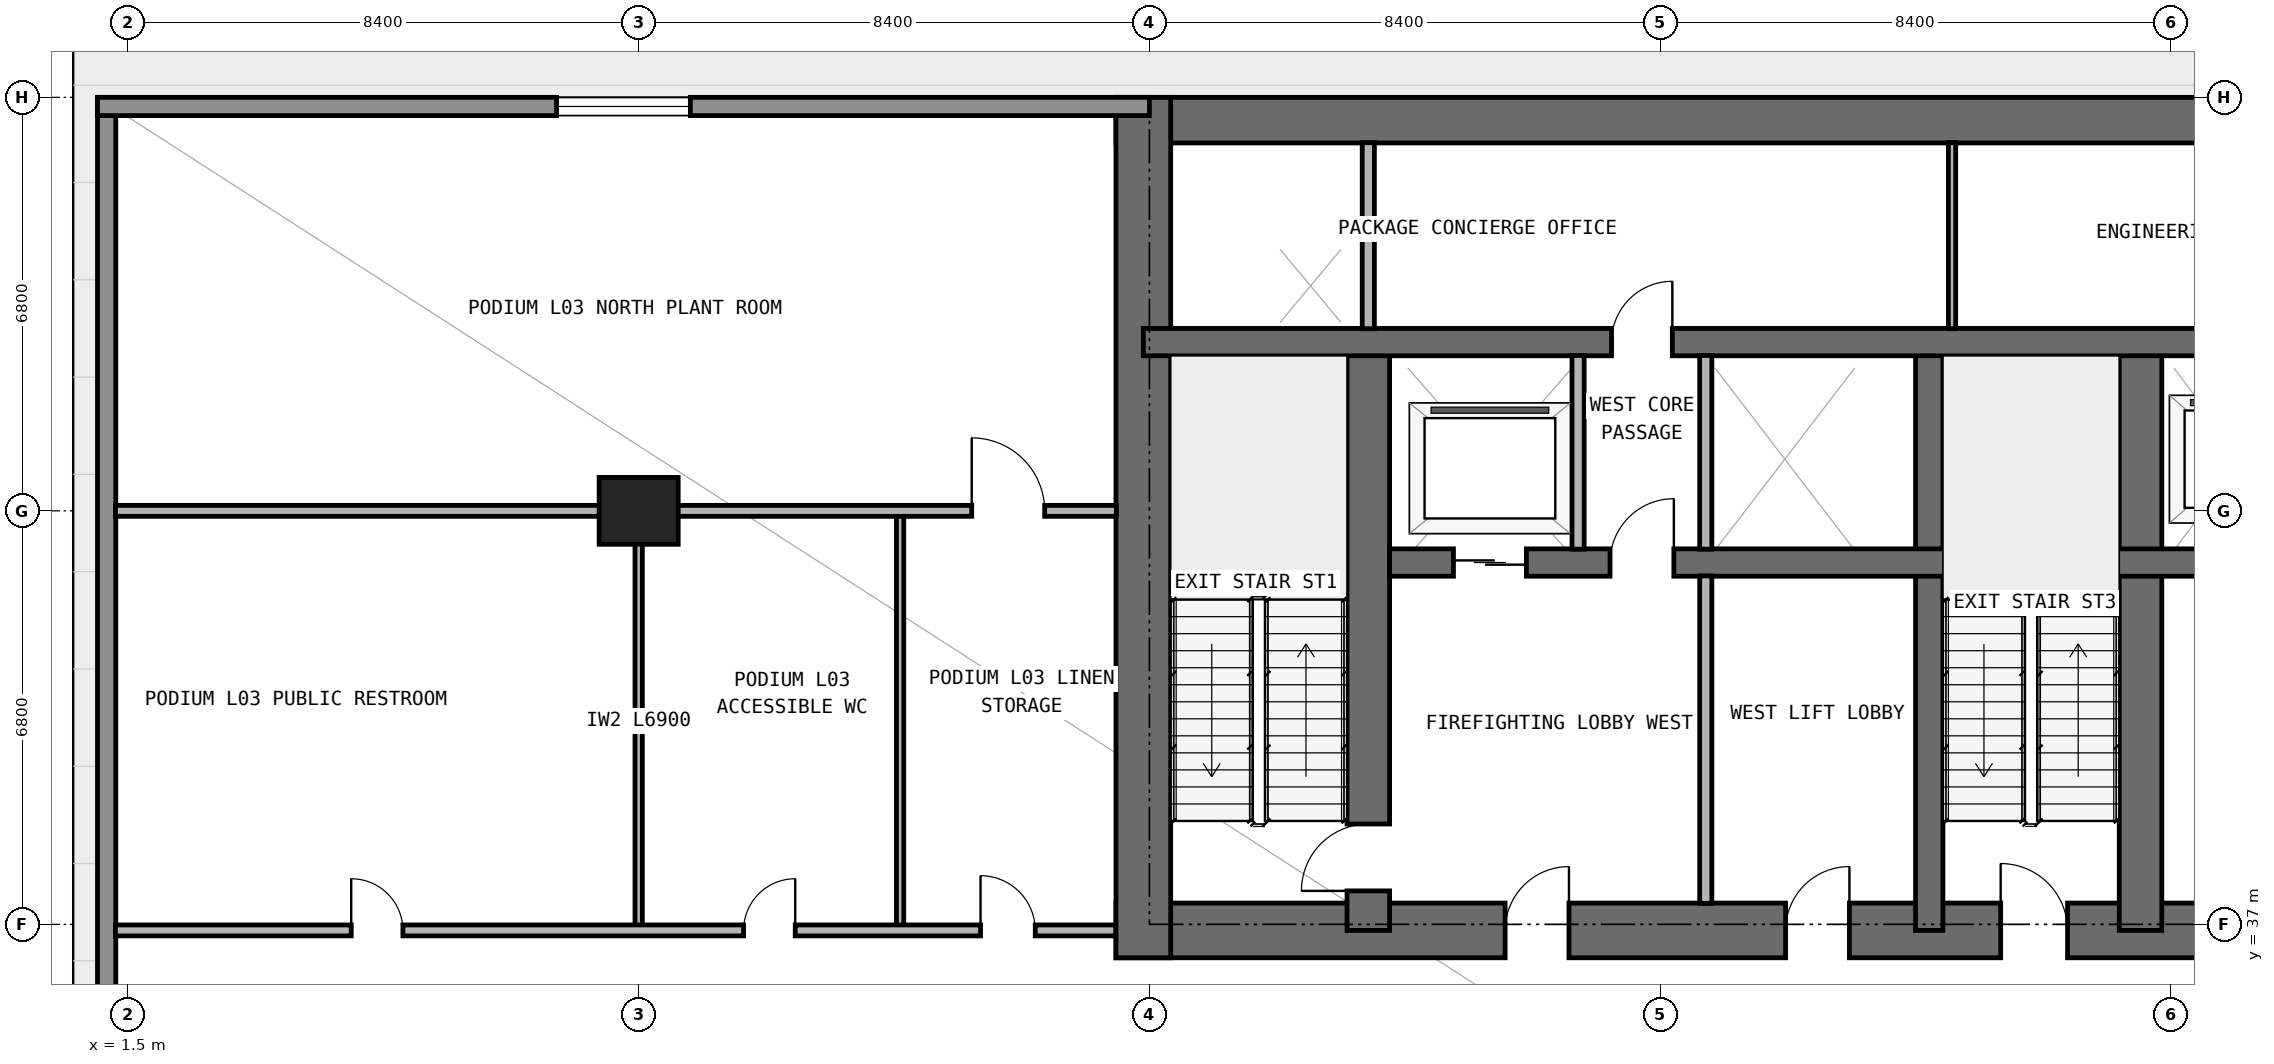
"""IFC4 building model, lengths in metres.
Left out: names, types, materials, properties, quantities, classifications, styles, units other than length and angle.
Written with IfcOpenShell. Run it as: python <this file> out.ifc"""

import sys

from ifc_helpers import new_model, si_unit, direction, frame, frame_2d, origin, origin_2d, place, context, subcontext, project, spatial, rectangle, extrude, element, fill, save


model = new_model("IFC4")
c1 = context("Model", 3, precision=1e-05, world=origin(), true_north=direction((0.0, 1.0)))
c2 = subcontext(c1, "Body", "Model", "MODEL_VIEW")
j1 = project(units=[si_unit("LENGTHUNIT", "METRE"), si_unit("PLANEANGLEUNIT", "RADIAN")], contexts=[c1])
p1 = place(None, origin())
s1 = spatial("IfcSite", under=j1, at=p1, CompositionType="ELEMENT")
p2 = place(p1, origin())
s2 = spatial("IfcBuilding", under=s1, at=p2, CompositionType="ELEMENT")
p3 = place(p2, frame((0.0, 0.0, 15.0)))
s3 = spatial("IfcBuildingStorey", under=s2, at=p3, CompositionType="ELEMENT", Elevation=15.0)
p4 = place(p3, frame((9.9, 43.8, 0.0), z_axis=(0.0, 0.0, 1.0), x_axis=(1.0, 0.0, 0.0)))
e1 = element("IfcColumn", 1, at=p4, inside=s3, PredefinedType="COLUMN", context=c2, shape_type="SweptSolid", body=[
    extrude(rectangle(XDim=1.3, YDim=1.1, at=origin_2d()), origin(), (0.0, 0.0, 1.0), 4.5),
])
p5 = place(p3, frame((17.75, 36.9, 0.0), z_axis=(0.0, 0.0, 1.0), x_axis=(1.0, 0.0, 0.0)))
e2 = element("IfcWall", 2, at=p5, inside=s3, PredefinedType="SHEAR", context=c2, shape_type="SweptSolid", body=[
    extrude(rectangle(XDim=42.3, YDim=0.9, at=frame_2d((21.15, 0.0))), origin(), (0.0, 0.0, 1.0), 4.5),
])
p6 = place(p5, frame((14.55, 0.0, 0.0)))
e3 = element("IfcOpeningElement", 3, at=p6, cuts=e2, PredefinedType="OPENING", context=c2, shape_type="SweptSolid", body=[
    extrude(rectangle(XDim=1.1, YDim=2.15, at=frame_2d((0.55, 1.075))), frame((0.0, 0.46, 0.0), z_axis=(0.0, -1.0, 0.0), x_axis=(1.0, 0.0, 0.0)), (0.0, 0.0, 1.0), 0.92),
])
p7 = place(p5, frame((6.4, 0.0, 0.0)))
e4 = element("IfcOpeningElement", 4, at=p7, cuts=e2, PredefinedType="OPENING", context=c2, shape_type="SweptSolid", body=[
    extrude(rectangle(XDim=1.05, YDim=2.15, at=frame_2d((0.525, 1.075))), frame((0.0, 0.46, 0.0), z_axis=(0.0, -1.0, 0.0), x_axis=(1.0, 0.0, 0.0)), (0.0, 0.0, 1.0), 0.92),
])
p8 = place(p5, frame((34.9, 0.0, 0.0)))
e5 = element("IfcOpeningElement", 5, at=p8, cuts=e2, PredefinedType="OPENING", context=c2, shape_type="SweptSolid", body=[
    extrude(rectangle(XDim=1.05, YDim=2.15, at=frame_2d((0.525, 1.075))), frame((0.0, 0.46, 0.0), z_axis=(0.0, -1.0, 0.0), x_axis=(1.0, 0.0, 0.0)), (0.0, 0.0, 1.0), 0.92),
])
p9 = place(p5, frame((11.012, 0.0, 0.0)))
e6 = element("IfcOpeningElement", 6, at=p9, cuts=e2, PredefinedType="OPENING", context=c2, shape_type="SweptSolid", body=[
    extrude(rectangle(XDim=1.05, YDim=2.15, at=frame_2d((0.525, 1.075))), frame((0.0, 0.46, 0.0), z_axis=(0.0, -1.0, 0.0), x_axis=(1.0, 0.0, 0.0)), (0.0, 0.0, 1.0), 0.92),
])
p10 = place(p5, frame((24.25, 0.0, 0.0)))
e7 = element("IfcOpeningElement", 7, at=p10, cuts=e2, PredefinedType="OPENING", context=c2, shape_type="SweptSolid", body=[
    extrude(rectangle(XDim=1.05, YDim=2.15, at=frame_2d((0.525, 1.075))), frame((0.0, 0.46, 0.0), z_axis=(0.0, -1.0, 0.0), x_axis=(1.0, 0.0, 0.0)), (0.0, 0.0, 1.0), 0.92),
])
p11 = place(p3, frame((17.75, 50.225, 0.0), z_axis=(0.0, 0.0, 1.0), x_axis=(1.0, 0.0, 0.0)))
e8 = element("IfcWall", 8, at=p11, inside=s3, PredefinedType="SHEAR", context=c2, shape_type="SweptSolid", body=[
    extrude(rectangle(XDim=42.3, YDim=0.75, at=frame_2d((21.15, 0.0))), origin(), (0.0, 0.0, 1.0), 4.5),
])
p12 = place(p3, frame((18.2, 36.45, 0.0), z_axis=(0.0, 0.0, 1.0), x_axis=(0.0, 1.0, 0.0)))
e9 = element("IfcWall", 9, at=p12, inside=s3, PredefinedType="SHEAR", context=c2, shape_type="SweptSolid", body=[
    extrude(rectangle(XDim=14.15, YDim=0.9, at=frame_2d((7.075, 0.0))), origin(), (0.0, 0.0, 1.0), 4.5),
])
p13 = place(p3, frame((21.9, 36.9, 0.0), z_axis=(0.0, 0.0, 1.0), x_axis=(0.0, 1.0, 0.0)))
e10 = element("IfcWall", 10, at=p13, inside=s3, PredefinedType="SHEAR", context=c2, shape_type="SweptSolid", body=[
    extrude(rectangle(XDim=9.675, YDim=0.7, at=frame_2d((4.837, 0.0))), origin(), (0.0, 0.0, 1.0), 4.5),
])
p14 = place(p13, frame((0.65, 0.0, 0.0)))
e11 = element("IfcOpeningElement", 11, at=p14, cuts=e10, PredefinedType="OPENING", context=c2, shape_type="SweptSolid", body=[
    extrude(rectangle(XDim=1.1, YDim=2.15, at=frame_2d((0.55, 1.075))), frame((0.0, 0.36, 0.0), z_axis=(0.0, -1.0, 0.0), x_axis=(1.0, 0.0, 0.0)), (0.0, 0.0, 1.0), 0.72),
])
p15 = place(p3, frame((31.125, 36.9, 0.0), z_axis=(0.0, 0.0, 1.0), x_axis=(0.0, 1.0, 0.0)))
e12 = element("IfcWall", 12, at=p15, inside=s3, PredefinedType="SHEAR", context=c2, shape_type="SweptSolid", body=[
    extrude(rectangle(XDim=9.675, YDim=0.45, at=frame_2d((4.837, 0.0))), origin(), (0.0, 0.0, 1.0), 4.5),
])
p16 = place(p3, frame((34.6, 36.9, 0.0), z_axis=(0.0, 0.0, 1.0), x_axis=(0.0, 1.0, 0.0)))
e13 = element("IfcWall", 13, at=p16, inside=s3, PredefinedType="SHEAR", context=c2, shape_type="SweptSolid", body=[
    extrude(rectangle(XDim=9.675, YDim=0.7, at=frame_2d((4.837, 0.0))), origin(), (0.0, 0.0, 1.0), 4.5),
])
p17 = place(p3, frame((22.25, 42.95, 0.0), z_axis=(0.0, 0.0, 1.0), x_axis=(1.0, 0.0, 0.0)))
e14 = element("IfcWall", 14, at=p17, inside=s3, PredefinedType="SHEAR", context=c2, shape_type="SweptSolid", body=[
    extrude(rectangle(XDim=33.3, YDim=0.45, at=frame_2d((16.65, 0.0))), origin(), (0.0, 0.0, 1.0), 4.5),
])
p18 = place(p17, frame((1.05, 0.0, 0.0)))
e15 = element("IfcOpeningElement", 15, at=p18, cuts=e14, PredefinedType="OPENING", context=c2, shape_type="SweptSolid", body=[
    extrude(rectangle(XDim=1.2, YDim=2.2, at=frame_2d((0.6, 1.1))), frame((0.0, 0.235, 0.0), z_axis=(0.0, -1.0, 0.0), x_axis=(1.0, 0.0, 0.0)), (0.0, 0.0, 1.0), 0.47),
])
p19 = place(p17, frame((31.05, 0.0, 0.0)))
e16 = element("IfcOpeningElement", 16, at=p19, cuts=e14, PredefinedType="OPENING", context=c2, shape_type="SweptSolid", body=[
    extrude(rectangle(XDim=1.2, YDim=2.2, at=frame_2d((0.6, 1.1))), frame((0.0, 0.235, 0.0), z_axis=(0.0, -1.0, 0.0), x_axis=(1.0, 0.0, 0.0)), (0.0, 0.0, 1.0), 0.47),
])
p20 = place(p17, frame((13.5, 0.0, 0.0)))
e17 = element("IfcOpeningElement", 17, at=p20, cuts=e14, PredefinedType="OPENING", context=c2, shape_type="SweptSolid", body=[
    extrude(rectangle(XDim=1.1, YDim=2.2, at=frame_2d((0.55, 1.1))), frame((0.0, 0.235, 0.0), z_axis=(0.0, -1.0, 0.0), x_axis=(1.0, 0.0, 0.0)), (0.0, 0.0, 1.0), 0.47),
])
p21 = place(p17, frame((16.1, 0.0, 0.0)))
e18 = element("IfcOpeningElement", 18, at=p21, cuts=e14, PredefinedType="OPENING", context=c2, shape_type="SweptSolid", body=[
    extrude(rectangle(XDim=1.1, YDim=2.2, at=frame_2d((0.55, 1.1))), frame((0.0, 0.235, 0.0), z_axis=(0.0, -1.0, 0.0), x_axis=(1.0, 0.0, 0.0)), (0.0, 0.0, 1.0), 0.47),
])
p22 = place(p17, frame((18.7, 0.0, 0.0)))
e19 = element("IfcOpeningElement", 19, at=p22, cuts=e14, PredefinedType="OPENING", context=c2, shape_type="SweptSolid", body=[
    extrude(rectangle(XDim=1.1, YDim=2.2, at=frame_2d((0.55, 1.1))), frame((0.0, 0.235, 0.0), z_axis=(0.0, -1.0, 0.0), x_axis=(1.0, 0.0, 0.0)), (0.0, 0.0, 1.0), 0.47),
])
p23 = place(p17, frame((3.625, 0.0, 0.0)))
e20 = element("IfcOpeningElement", 20, at=p23, cuts=e14, PredefinedType="OPENING", context=c2, shape_type="SweptSolid", body=[
    extrude(rectangle(XDim=1.05, YDim=2.15, at=frame_2d((0.525, 1.075))), frame((0.0, 0.235, 0.0), z_axis=(0.0, -1.0, 0.0), x_axis=(1.0, 0.0, 0.0)), (0.0, 0.0, 1.0), 0.47),
])
p24 = place(p17, frame((28.675, 0.0, 0.0)))
e21 = element("IfcOpeningElement", 21, at=p24, cuts=e14, PredefinedType="OPENING", context=c2, shape_type="SweptSolid", body=[
    extrude(rectangle(XDim=1.05, YDim=2.15, at=frame_2d((0.525, 1.075))), frame((0.0, 0.235, 0.0), z_axis=(0.0, -1.0, 0.0), x_axis=(1.0, 0.0, 0.0)), (0.0, 0.0, 1.0), 0.47),
])
p25 = place(p3, frame((18.2, 46.575, 0.0), z_axis=(0.0, 0.0, 1.0), x_axis=(1.0, 0.0, 0.0)))
e22 = element("IfcWall", 22, at=p25, inside=s3, PredefinedType="SHEAR", context=c2, shape_type="SweptSolid", body=[
    extrude(rectangle(XDim=41.4, YDim=0.45, at=frame_2d((20.7, 0.0))), origin(), (0.0, 0.0, 1.0), 4.5),
])
p26 = place(p25, frame((7.7, 0.0, 0.0)))
e23 = element("IfcOpeningElement", 23, at=p26, cuts=e22, PredefinedType="OPENING", context=c2, shape_type="SweptSolid", body=[
    extrude(rectangle(XDim=1.0, YDim=2.2, at=frame_2d((0.5, 1.1))), frame((0.0, 0.235, 0.0), z_axis=(0.0, -1.0, 0.0), x_axis=(1.0, 0.0, 0.0)), (0.0, 0.0, 1.0), 0.47),
])
p27 = place(p25, frame((32.725, 0.0, 0.0)))
e24 = element("IfcOpeningElement", 24, at=p27, cuts=e22, PredefinedType="OPENING", context=c2, shape_type="SweptSolid", body=[
    extrude(rectangle(XDim=1.05, YDim=2.15, at=frame_2d((0.525, 1.075))), frame((0.0, 0.235, 0.0), z_axis=(0.0, -1.0, 0.0), x_axis=(1.0, 0.0, 0.0)), (0.0, 0.0, 1.0), 0.47),
])
p28 = place(p3, frame((1.15, 26.2, 0.0), z_axis=(0.0, 0.0, 1.0), x_axis=(0.0, 1.0, 0.0)))
e25 = element("IfcWall", 25, at=p28, inside=s3, PredefinedType="STANDARD", context=c2, shape_type="SweptSolid", body=[
    extrude(rectangle(XDim=24.4, YDim=0.3, at=frame_2d((12.2, 0.0))), origin(), (0.0, 0.0, 1.0), 4.5),
])
p29 = place(p3, frame((1.0, 50.45, 0.0), z_axis=(0.0, 0.0, 1.0), x_axis=(1.0, 0.0, 0.0)))
e26 = element("IfcWall", 26, at=p29, inside=s3, PredefinedType="STANDARD", context=c2, shape_type="SweptSolid", body=[
    extrude(rectangle(XDim=17.3, YDim=0.3, at=frame_2d((8.65, 0.0))), origin(), (0.0, 0.0, 1.0), 4.5),
])
p30 = place(p29, frame((7.55, 0.0, 0.85)))
e27 = element("IfcOpeningElement", 27, at=p30, cuts=e26, PredefinedType="OPENING", context=c2, shape_type="SweptSolid", body=[
    extrude(rectangle(XDim=2.2, YDim=1.55, at=frame_2d((1.1, 0.775))), frame((0.0, 0.16, 0.0), z_axis=(0.0, -1.0, 0.0), x_axis=(1.0, 0.0, 0.0)), (0.0, 0.0, 1.0), 0.32),
])
p31 = place(p3, frame((9.9, 36.9, 0.0), z_axis=(0.0, 0.0, 1.0), x_axis=(0.0, 1.0, 0.0)))
e28 = element("IfcWall", 28, at=p31, inside=s3, PredefinedType="PARTITIONING", context=c2, shape_type="SweptSolid", body=[
    extrude(rectangle(XDim=6.9, YDim=0.12, at=frame_2d((3.45, 0.0))), origin(), (0.0, 0.0, 1.0), 3.464),
])
p32 = place(p3, frame((14.2, 36.9, 0.0), z_axis=(0.0, 0.0, 1.0), x_axis=(0.0, 1.0, 0.0)))
e29 = element("IfcWall", 29, at=p32, inside=s3, PredefinedType="PARTITIONING", context=c2, shape_type="SweptSolid", body=[
    extrude(rectangle(XDim=6.9, YDim=0.12, at=frame_2d((3.45, 0.0))), origin(), (0.0, 0.0, 1.0), 4.5),
])
p33 = place(p3, frame((21.9, 46.795, 0.0), z_axis=(0.0, 0.0, 1.0), x_axis=(0.0, 1.0, 0.0)))
e30 = element("IfcWall", 30, at=p33, inside=s3, PredefinedType="PARTITIONING", context=c2, shape_type="SweptSolid", body=[
    extrude(rectangle(XDim=3.06, YDim=0.2, at=frame_2d((1.53, 0.0))), origin(), (0.0, 0.0, 1.0), 4.5),
])
p34 = place(p3, frame((25.35, 43.17, 0.0), z_axis=(0.0, 0.0, 1.0), x_axis=(0.0, 1.0, 0.0)))
e31 = element("IfcWall", 31, at=p34, inside=s3, PredefinedType="PARTITIONING", context=c2, shape_type="SweptSolid", body=[
    extrude(rectangle(XDim=3.185, YDim=0.2, at=frame_2d((1.593, 0.0))), origin(), (0.0, 0.0, 1.0), 4.5),
])
p35 = place(p3, frame((27.45, 37.345, 0.0), z_axis=(0.0, 0.0, 1.0), x_axis=(0.0, 1.0, 0.0)))
e32 = element("IfcWall", 32, at=p35, inside=s3, PredefinedType="PARTITIONING", context=c2, shape_type="SweptSolid", body=[
    extrude(rectangle(XDim=5.385, YDim=0.2, at=frame_2d((2.692, 0.0))), origin(), (0.0, 0.0, 1.0), 4.5),
])
p36 = place(p3, frame((27.45, 43.17, 0.0), z_axis=(0.0, 0.0, 1.0), x_axis=(0.0, 1.0, 0.0)))
e33 = element("IfcWall", 33, at=p36, inside=s3, PredefinedType="PARTITIONING", context=c2, shape_type="SweptSolid", body=[
    extrude(rectangle(XDim=3.185, YDim=0.2, at=frame_2d((1.593, 0.0))), origin(), (0.0, 0.0, 1.0), 4.5),
])
p37 = place(p3, frame((31.5, 46.795, 0.0), z_axis=(0.0, 0.0, 1.0), x_axis=(0.0, 1.0, 0.0)))
e34 = element("IfcWall", 34, at=p37, inside=s3, PredefinedType="PARTITIONING", context=c2, shape_type="SweptSolid", body=[
    extrude(rectangle(XDim=3.06, YDim=0.12, at=frame_2d((1.53, 0.0))), origin(), (0.0, 0.0, 1.0), 4.5),
])
p38 = place(p3, frame((1.295, 36.9, 0.0), z_axis=(0.0, 0.0, 1.0), x_axis=(1.0, 0.0, 0.0)))
e35 = element("IfcWall", 35, at=p38, inside=s3, PredefinedType="PARTITIONING", context=c2, shape_type="SweptSolid", body=[
    extrude(rectangle(XDim=16.45, YDim=0.18, at=frame_2d((8.225, 0.0))), origin(), (0.0, 0.0, 1.0), 4.5),
])
p39 = place(p38, frame((3.877, 0.0, 0.0)))
e36 = element("IfcOpeningElement", 36, at=p39, cuts=e35, PredefinedType="OPENING", context=c2, shape_type="SweptSolid", body=[
    extrude(rectangle(XDim=0.85, YDim=2.1, at=frame_2d((0.425, 1.05))), frame((0.0, 0.1, 0.0), z_axis=(0.0, -1.0, 0.0), x_axis=(1.0, 0.0, 0.0)), (0.0, 0.0, 1.0), 0.2),
])
p40 = place(p38, frame((10.33, 0.0, 0.0)))
e37 = element("IfcOpeningElement", 37, at=p40, cuts=e35, PredefinedType="OPENING", context=c2, shape_type="SweptSolid", body=[
    extrude(rectangle(XDim=0.85, YDim=2.1, at=frame_2d((0.425, 1.05))), frame((0.0, 0.1, 0.0), z_axis=(0.0, -1.0, 0.0), x_axis=(1.0, 0.0, 0.0)), (0.0, 0.0, 1.0), 0.2),
])
p41 = place(p38, frame((14.228, 0.0, 0.0)))
e38 = element("IfcOpeningElement", 38, at=p41, cuts=e35, PredefinedType="OPENING", context=c2, shape_type="SweptSolid", body=[
    extrude(rectangle(XDim=0.9, YDim=2.15, at=frame_2d((0.45, 1.075))), frame((0.0, 0.1, 0.0), z_axis=(0.0, -1.0, 0.0), x_axis=(1.0, 0.0, 0.0)), (0.0, 0.0, 1.0), 0.2),
])
p42 = place(p3, frame((1.295, 43.8, 0.0), z_axis=(0.0, 0.0, 1.0), x_axis=(1.0, 0.0, 0.0)))
e39 = element("IfcWall", 39, at=p42, inside=s3, PredefinedType="PARTITIONING", context=c2, shape_type="SweptSolid", body=[
    extrude(rectangle(XDim=16.46, YDim=0.18, at=frame_2d((8.23, 0.0))), origin(), (0.0, 0.0, 1.0), 3.789),
])
p43 = place(p42, frame((14.083, 0.0, 0.0)))
e40 = element("IfcOpeningElement", 40, at=p43, cuts=e39, PredefinedType="OPENING", context=c2, shape_type="SweptSolid", body=[
    extrude(rectangle(XDim=1.2, YDim=2.2, at=frame_2d((0.6, 1.1))), frame((0.0, 0.1, 0.0), z_axis=(0.0, -1.0, 0.0), x_axis=(1.0, 0.0, 0.0)), (0.0, 0.0, 1.0), 0.2),
])
p44 = place(p30, origin())
e41 = element("IfcWindow", 41, at=p44, inside=s3, PartitioningType="SINGLE_PANEL", PredefinedType="WINDOW", context=c2, shape_type="SweptSolid", body=[
    extrude(rectangle(XDim=2.2, YDim=1.55, at=frame_2d((1.1, 0.775))), frame((0.0, 0.03, 0.0), z_axis=(0.0, -1.0, 0.0), x_axis=(1.0, 0.0, 0.0)), (0.0, 0.0, 1.0), 0.06),
])
fill(e27, e41)
p45 = place(p18, origin())
e42 = element("IfcDoor", 42, at=p45, inside=s3, OperationType="DOUBLE_DOOR_SLIDING", PredefinedType="DOOR", context=c2, shape_type="SweptSolid", body=[
    extrude(rectangle(XDim=1.2, YDim=2.2, at=frame_2d((0.6, 1.1))), frame((0.0, 0.025, 0.0), z_axis=(0.0, -1.0, 0.0), x_axis=(1.0, 0.0, 0.0)), (0.0, 0.0, 1.0), 0.05),
])
fill(e15, e42)
p46 = place(p6, origin())
e43 = element("IfcDoor", 43, at=p46, inside=s3, OperationType="SINGLE_SWING_LEFT", PredefinedType="DOOR", context=c2, shape_type="SweptSolid", body=[
    extrude(rectangle(XDim=1.1, YDim=2.15, at=frame_2d((0.55, 1.075))), frame((0.0, 0.025, 0.0), z_axis=(0.0, -1.0, 0.0), x_axis=(1.0, 0.0, 0.0)), (0.0, 0.0, 1.0), 0.05),
])
fill(e3, e43)
p47 = place(p7, origin())
e44 = element("IfcDoor", 44, at=p47, inside=s3, OperationType="SINGLE_SWING_RIGHT", PredefinedType="DOOR", context=c2, shape_type="SweptSolid", body=[
    extrude(rectangle(XDim=1.05, YDim=2.15, at=frame_2d((0.525, 1.075))), frame((0.0, 0.025, 0.0), z_axis=(0.0, -1.0, 0.0), x_axis=(1.0, 0.0, 0.0)), (0.0, 0.0, 1.0), 0.05),
])
fill(e4, e44)
p48 = place(p14, origin())
e45 = element("IfcDoor", 45, at=p48, inside=s3, OperationType="SINGLE_SWING_LEFT", PredefinedType="DOOR", context=c2, shape_type="SweptSolid", body=[
    extrude(rectangle(XDim=1.1, YDim=2.15, at=frame_2d((0.55, 1.075))), frame((0.0, 0.025, 0.0), z_axis=(0.0, -1.0, 0.0), x_axis=(1.0, 0.0, 0.0)), (0.0, 0.0, 1.0), 0.05),
])
fill(e11, e45)
p49 = place(p23, origin())
e46 = element("IfcDoor", 46, at=p49, inside=s3, OperationType="SINGLE_SWING_RIGHT", PredefinedType="DOOR", context=c2, shape_type="SweptSolid", body=[
    extrude(rectangle(XDim=1.05, YDim=2.15, at=frame_2d((0.525, 1.075))), frame((0.0, 0.025, 0.0), z_axis=(0.0, -1.0, 0.0), x_axis=(1.0, 0.0, 0.0)), (0.0, 0.0, 1.0), 0.05),
])
fill(e20, e46)
p50 = place(p9, origin())
e47 = element("IfcDoor", 47, at=p50, inside=s3, OperationType="SINGLE_SWING_RIGHT", PredefinedType="DOOR", context=c2, shape_type="SweptSolid", body=[
    extrude(rectangle(XDim=1.05, YDim=2.15, at=frame_2d((0.525, 1.075))), frame((0.0, 0.025, 0.0), z_axis=(0.0, -1.0, 0.0), x_axis=(1.0, 0.0, 0.0)), (0.0, 0.0, 1.0), 0.05),
])
fill(e6, e47)
p51 = place(p26, origin())
e48 = element("IfcDoor", 48, at=p51, inside=s3, OperationType="SINGLE_SWING_RIGHT", PredefinedType="DOOR", context=c2, shape_type="SweptSolid", body=[
    extrude(rectangle(XDim=1.0, YDim=2.2, at=frame_2d((0.5, 1.1))), frame((0.0, 0.025, 0.0), z_axis=(0.0, -1.0, 0.0), x_axis=(1.0, 0.0, 0.0)), (0.0, 0.0, 1.0), 0.05),
])
fill(e23, e48)
p52 = place(p39, origin())
e49 = element("IfcDoor", 49, at=p52, inside=s3, OperationType="SINGLE_SWING_LEFT", PredefinedType="DOOR", context=c2, shape_type="SweptSolid", body=[
    extrude(rectangle(XDim=0.85, YDim=2.1, at=frame_2d((0.425, 1.05))), frame((0.0, 0.025, 0.0), z_axis=(0.0, -1.0, 0.0), x_axis=(1.0, 0.0, 0.0)), (0.0, 0.0, 1.0), 0.05),
])
fill(e36, e49)
p53 = place(p40, origin())
e50 = element("IfcDoor", 50, at=p53, inside=s3, OperationType="SINGLE_SWING_RIGHT", PredefinedType="DOOR", context=c2, shape_type="SweptSolid", body=[
    extrude(rectangle(XDim=0.85, YDim=2.1, at=frame_2d((0.425, 1.05))), frame((0.0, 0.025, 0.0), z_axis=(0.0, -1.0, 0.0), x_axis=(1.0, 0.0, 0.0)), (0.0, 0.0, 1.0), 0.05),
])
fill(e37, e50)
p54 = place(p41, origin())
e51 = element("IfcDoor", 51, at=p54, inside=s3, OperationType="SINGLE_SWING_LEFT", PredefinedType="DOOR", context=c2, shape_type="SweptSolid", body=[
    extrude(rectangle(XDim=0.9, YDim=2.15, at=frame_2d((0.45, 1.075))), frame((0.0, 0.025, 0.0), z_axis=(0.0, -1.0, 0.0), x_axis=(1.0, 0.0, 0.0)), (0.0, 0.0, 1.0), 0.05),
])
fill(e38, e51)
p55 = place(p43, origin())
e52 = element("IfcDoor", 52, at=p55, inside=s3, OperationType="SINGLE_SWING_LEFT", PredefinedType="DOOR", context=c2, shape_type="SweptSolid", body=[
    extrude(rectangle(XDim=1.2, YDim=2.2, at=frame_2d((0.6, 1.1))), frame((0.0, 0.025, 0.0), z_axis=(0.0, -1.0, 0.0), x_axis=(1.0, 0.0, 0.0)), (0.0, 0.0, 1.0), 0.05),
])
fill(e40, e52)
save(model, sys.argv[1])
